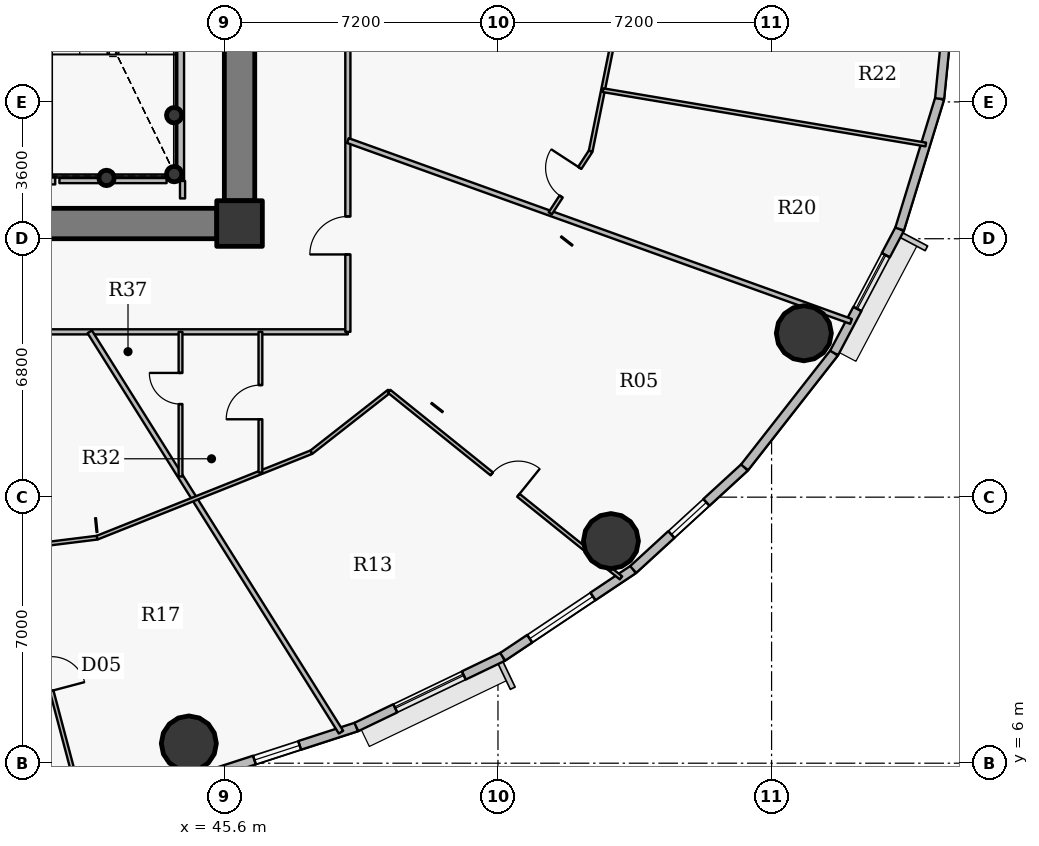
"""IFC4 building model, lengths in metres.
Left out: names, types, materials, properties, quantities, classifications, styles, units other than length and angle.
Written with IfcOpenShell. Run it as: python <this file> out.ifc"""

import sys

from ifc_helpers import new_model, si_unit, direction, frame, frame_2d, origin, origin_2d, place, context, subcontext, project, spatial, rectangle, hollow_circle, extrude, source, transform, mapped, element, fill, save


model = new_model("IFC4")
c1 = context("Model", 3, precision=1e-05, world=origin(), true_north=direction((0.0, 1.0)))
c2 = subcontext(c1, "Body", "Model", "MODEL_VIEW")
j1 = project(units=[si_unit("LENGTHUNIT", "METRE"), si_unit("PLANEANGLEUNIT", "RADIAN")], contexts=[c1])
p1 = place(None, origin())
s1 = spatial("IfcSite", under=j1, at=p1, CompositionType="ELEMENT")
p2 = place(p1, origin())
s2 = spatial("IfcBuilding", under=s1, at=p2, CompositionType="ELEMENT")
p3 = place(p2, frame((0.0, 0.0, 115.95)))
s3 = spatial("IfcBuildingStorey", under=s2, at=p3, CompositionType="ELEMENT", Elevation=115.95)
p4 = place(p3, frame((46.0, 20.2, 0.0), z_axis=(0.0, 0.0, 1.0), x_axis=(1.0, 0.0, 0.0)))
e1 = element("IfcColumn", 1, at=p4, inside=s3, PredefinedType="COLUMN", context=c2, shape_type="SweptSolid", body=[
    extrude(rectangle(XDim=1.2, YDim=1.2, at=origin_2d()), origin(), (0.0, 0.0, 1.0), 3.75),
])
for number, where, z_axis, x_axis in (
    (2, (44.28, 21.5, 0.0), (0.0, 0.0, 1.0), (1.0, 0.0, 0.0)),
    (3, (44.28, 23.05, 0.0), (0.0, 0.0, 1.0), (1.0, 0.0, 0.0)),
    (4, (42.5, 21.4, 0.0), (0.0, 0.0, 1.0), (1.0, 0.0, 0.0)),
):
    element("IfcColumn", number, at=place(p3, frame(where, z_axis=z_axis, x_axis=x_axis)), inside=s3, PredefinedType="COLUMN", context=c2, shape_type="SweptSolid", body=[
        extrude(hollow_circle(Radius=0.203, WallThickness=0.016, at=origin_2d()), origin(), (0.0, 0.0, 1.0), 3.75),
    ])
p5 = place(p3, frame((46.0, 33.2, 0.0), z_axis=(0.0, 0.0, 1.0), x_axis=(0.0, -1.0, 0.0)))
e5 = element("IfcWall", 5, at=p5, inside=s3, PredefinedType="SHEAR", context=c2, shape_type="SweptSolid", body=[
    extrude(rectangle(XDim=12.4, YDim=0.8, at=frame_2d((6.2, 0.0))), origin(), (0.0, 0.0, 1.0), 2.95),
])
p6 = place(p5, frame((5.79, 0.0, 0.0)))
e6 = element("IfcOpeningElement", 6, at=p6, cuts=e5, PredefinedType="OPENING", context=c2, shape_type="SweptSolid", body=[
    extrude(rectangle(XDim=0.82, YDim=2.1, at=origin_2d()), frame((0.41, 0.41, 1.05), z_axis=(0.0, -1.0, 0.0), x_axis=(1.0, 0.0, 0.0)), (0.0, 0.0, 1.0), 0.82),
])
p7 = place(p3, frame((45.4, 20.2, 0.0), z_axis=(0.0, 0.0, 1.0), x_axis=(-1.0, 0.0, 0.0)))
e7 = element("IfcWall", 7, at=p7, inside=s3, PredefinedType="SHEAR", context=c2, shape_type="SweptSolid", body=[
    extrude(rectangle(XDim=18.8, YDim=0.8, at=frame_2d((9.4, 0.0))), origin(), (0.0, 0.0, 1.0), 2.95),
])
p8 = place(p7, frame((10.15, 0.0, 0.0)))
e8 = element("IfcOpeningElement", 8, at=p8, cuts=e7, PredefinedType="OPENING", context=c2, shape_type="SweptSolid", body=[
    extrude(rectangle(XDim=1.15, YDim=2.15, at=origin_2d()), frame((0.575, 0.41, 1.075), z_axis=(0.0, -1.0, 0.0), x_axis=(1.0, 0.0, 0.0)), (0.0, 0.0, 1.0), 0.82),
])
for number, where, z_axis, x_axis in (
    (9, (44.666, 6.519, 0.0), (0.0, 0.0, 1.0), (1.0, 0.0, 0.0)),
    (10, (55.773, 11.844, 0.0), (0.0, 0.0, 1.0), (1.0, 0.0, 0.0)),
    (11, (60.849, 17.312, 0.0), (0.0, 0.0, 1.0), (1.0, 0.0, 0.0)),
):
    element("IfcColumn", number, at=place(p3, frame(where, z_axis=z_axis, x_axis=x_axis)), inside=s3, PredefinedType="COLUMN", context=c2, shape_type="SweptSolid", body=[
        extrude(hollow_circle(Radius=0.725, WallThickness=0.042, at=origin_2d()), origin(), (0.0, 0.0, 1.0), 3.75),
    ])
p9 = place(p3, frame((49.074, 6.953, 0.0), z_axis=(0.0, 0.0, 1.0), x_axis=(-0.951211346073, -0.308540070495, 0.0)))
e12 = element("IfcWall", 12, at=p9, inside=s3, PredefinedType="SOLIDWALL", context=c2, shape_type="SweptSolid", body=[
    extrude(rectangle(XDim=4.388, YDim=0.24, at=frame_2d((2.194, 0.0))), origin(), (0.0, 0.0, 1.0), 3.5),
])
p10 = place(p9, frame((1.569, 0.0, 0.9)))
e13 = element("IfcOpeningElement", 13, at=p10, cuts=e12, PredefinedType="OPENING", context=c2, shape_type="SweptSolid", body=[
    extrude(rectangle(XDim=1.25, YDim=1.65, at=origin_2d()), frame((0.625, 0.13, 0.825), z_axis=(0.0, -1.0, 0.0), x_axis=(1.0, 0.0, 0.0)), (0.0, 0.0, 1.0), 0.26),
])
p11 = place(p3, frame((52.925, 8.801, 0.0), z_axis=(0.0, 0.0, 1.0), x_axis=(-0.901589935876, -0.432591709962, 0.0)))
e14 = element("IfcWall", 14, at=p11, inside=s3, PredefinedType="SOLIDWALL", context=c2, shape_type="SweptSolid", body=[
    extrude(rectangle(XDim=4.272, YDim=0.24, at=frame_2d((2.136, 0.0))), origin(), (0.0, 0.0, 1.0), 3.5),
])
p12 = place(p11, frame((1.136, 0.0, 0.9)))
e15 = element("IfcOpeningElement", 15, at=p12, cuts=e14, PredefinedType="OPENING", context=c2, shape_type="SweptSolid", body=[
    extrude(rectangle(XDim=2.0, YDim=1.75, at=origin_2d()), frame((1.0, 0.13, 0.875), z_axis=(0.0, -1.0, 0.0), x_axis=(1.0, 0.0, 0.0)), (0.0, 0.0, 1.0), 0.26),
])
p13 = place(p3, frame((56.358, 11.097, 0.0), z_axis=(0.0, 0.0, 1.0), x_axis=(-0.831221811447, -0.555940914284, 0.0)))
e16 = element("IfcWall", 16, at=p13, inside=s3, PredefinedType="SOLIDWALL", context=c2, shape_type="SweptSolid", body=[
    extrude(rectangle(XDim=4.13, YDim=0.24, at=frame_2d((2.065, 0.0))), origin(), (0.0, 0.0, 1.0), 3.5),
])
p14 = place(p13, frame((1.276, 0.0, 0.9)))
e17 = element("IfcOpeningElement", 17, at=p14, cuts=e16, PredefinedType="OPENING", context=c2, shape_type="SweptSolid", body=[
    extrude(rectangle(XDim=2.0, YDim=1.75, at=origin_2d()), frame((1.0, 0.13, 0.875), z_axis=(0.0, -1.0, 0.0), x_axis=(1.0, 0.0, 0.0)), (0.0, 0.0, 1.0), 0.26),
])
p15 = place(p3, frame((59.289, 13.783, 0.0), z_axis=(0.0, 0.0, 1.0), x_axis=(-0.737113356241, -0.675769117414, 0.0)))
e18 = element("IfcWall", 18, at=p15, inside=s3, PredefinedType="SOLIDWALL", context=c2, shape_type="SweptSolid", body=[
    extrude(rectangle(XDim=3.976, YDim=0.24, at=frame_2d((1.988, 0.0))), origin(), (0.0, 0.0, 1.0), 3.5),
])
p16 = place(p15, frame((1.363, 0.0, 0.9)))
e19 = element("IfcOpeningElement", 19, at=p16, cuts=e18, PredefinedType="OPENING", context=c2, shape_type="SweptSolid", body=[
    extrude(rectangle(XDim=1.25, YDim=1.65, at=origin_2d()), frame((0.625, 0.13, 0.825), z_axis=(0.0, -1.0, 0.0), x_axis=(1.0, 0.0, 0.0)), (0.0, 0.0, 1.0), 0.26),
])
p17 = place(p3, frame((61.645, 16.794, 0.0), z_axis=(0.0, 0.0, 1.0), x_axis=(-0.616272103517, -0.787533297345, 0.0)))
e20 = element("IfcWall", 20, at=p17, inside=s3, PredefinedType="SOLIDWALL", context=c2, shape_type="SweptSolid", body=[
    extrude(rectangle(XDim=3.823, YDim=0.24, at=frame_2d((1.912, 0.0))), origin(), (0.0, 0.0, 1.0), 3.5),
])
p18 = place(p3, frame((63.37, 20.055, 0.0), z_axis=(0.0, 0.0, 1.0), x_axis=(-0.467614004126, -0.883932770716, 0.0)))
e21 = element("IfcWall", 21, at=p18, inside=s3, PredefinedType="SOLIDWALL", context=c2, shape_type="SweptSolid", body=[
    extrude(rectangle(XDim=3.689, YDim=0.24, at=frame_2d((1.844, 0.0))), origin(), (0.0, 0.0, 1.0), 3.5),
])
p19 = place(p18, frame((0.778, 0.0, 0.9)))
e22 = element("IfcOpeningElement", 22, at=p19, cuts=e21, PredefinedType="OPENING", context=c2, shape_type="SweptSolid", body=[
    extrude(rectangle(XDim=1.6, YDim=1.75, at=origin_2d()), frame((0.8, 0.13, 0.875), z_axis=(0.0, -1.0, 0.0), x_axis=(1.0, 0.0, 0.0)), (0.0, 0.0, 1.0), 0.26),
])
p20 = place(p3, frame((64.422, 23.485, 0.0), z_axis=(0.0, 0.0, 1.0), x_axis=(-0.293124431344, -0.956074300329, 0.0)))
e23 = element("IfcWall", 23, at=p20, inside=s3, PredefinedType="SOLIDWALL", context=c2, shape_type="SweptSolid", body=[
    extrude(rectangle(XDim=3.587, YDim=0.24, at=frame_2d((1.793, 0.0))), origin(), (0.0, 0.0, 1.0), 3.5),
])
p21 = place(p3, frame((64.775, 27.0, 0.0), z_axis=(0.0, 0.0, 1.0), x_axis=(-0.099989468229, -0.994988495533, 0.0)))
e24 = element("IfcWall", 24, at=p21, inside=s3, PredefinedType="SOLIDWALL", context=c2, shape_type="SweptSolid", body=[
    extrude(rectangle(XDim=3.533, YDim=0.24, at=frame_2d((1.767, 0.0))), origin(), (0.0, 0.0, 1.0), 3.5),
])
p22 = place(p3, frame((35.584, 17.35, 0.0), z_axis=(0.0, 0.0, 1.0), x_axis=(1.0, 0.0, 0.0)))
e25 = element("IfcWall", 25, at=p22, inside=s3, PredefinedType="PARTITIONING", context=c2, shape_type="SweptSolid", body=[
    extrude(rectangle(XDim=13.266, YDim=0.135, at=frame_2d((6.633, 0.0))), origin(), (0.0, 0.0, 1.0), 2.935),
])
p23 = place(p22, frame((2.757, 0.0, 0.0)))
e26 = element("IfcOpeningElement", 26, at=p23, cuts=e25, PredefinedType="OPENING", context=c2, shape_type="SweptSolid", body=[
    extrude(rectangle(XDim=1.0, YDim=2.15, at=origin_2d()), frame((0.5, 0.078, 1.075), z_axis=(0.0, -1.0, 0.0), x_axis=(1.0, 0.0, 0.0)), (0.0, 0.0, 1.0), 0.155),
])
p24 = place(p3, frame((40.059, 11.662, 0.0), z_axis=(0.0, 0.0, 1.0), x_axis=(0.255861334688, -0.966713492929, 0.0)))
e27 = element("IfcWall", 27, at=p24, inside=s3, PredefinedType="PARTITIONING", context=c2, shape_type="SweptSolid", body=[
    extrude(rectangle(XDim=6.877, YDim=0.1, at=frame_2d((3.438, 0.0))), origin(), (0.0, 0.0, 1.0), 2.935),
])
p25 = place(p24, frame((2.988, 0.0, 0.0)))
e28 = element("IfcOpeningElement", 28, at=p25, cuts=e27, PredefinedType="OPENING", context=c2, shape_type="SweptSolid", body=[
    extrude(rectangle(XDim=0.9, YDim=2.1, at=origin_2d()), frame((0.45, 0.06, 1.05), z_axis=(0.0, -1.0, 0.0), x_axis=(1.0, 0.0, 0.0)), (0.0, 0.0, 1.0), 0.12),
])
p26 = place(p3, frame((40.059, 11.662, 0.0), z_axis=(0.0, 0.0, 1.0), x_axis=(0.992393057675, 0.12310978466, 0.0)))
e29 = element("IfcWall", 29, at=p26, inside=s3, PredefinedType="PARTITIONING", context=c2, shape_type="SweptSolid", body=[
    extrude(rectangle(XDim=2.209, YDim=0.1, at=frame_2d((1.104, 0.0))), origin(), (0.0, 0.0, 1.0), 2.935),
])
p27 = place(p3, frame((40.9, 21.33, 0.0), z_axis=(0.0, 0.0, 1.0), x_axis=(1.0, 0.0, 0.0)))
e30 = element("IfcWall", 30, at=p27, inside=s3, PredefinedType="PARTITIONING", context=c2, shape_type="SweptSolid", body=[
    extrude(rectangle(XDim=0.25, YDim=0.2, at=frame_2d((0.125, 0.0))), origin(), (0.0, 0.0, 1.0), 3.035),
])
p28 = place(p3, frame((42.058, 17.35, 0.0), z_axis=(0.0, 0.0, 1.0), x_axis=(0.531660079213, -0.846957826678, 0.0)))
e31 = element("IfcWall", 31, at=p28, inside=s3, PredefinedType="PARTITIONING", context=c2, shape_type="SweptSolid", body=[
    extrude(rectangle(XDim=12.437, YDim=0.135, at=frame_2d((6.219, 0.0))), origin(), (0.0, 0.0, 1.0), 2.935),
])
p29 = place(p3, frame((42.251, 11.934, 0.0), z_axis=(0.0, 0.0, 1.0), x_axis=(0.928803554156, 0.370572473055, 0.0)))
e32 = element("IfcWall", 32, at=p29, inside=s3, PredefinedType="PARTITIONING", context=c2, shape_type="SweptSolid", body=[
    extrude(rectangle(XDim=6.072, YDim=0.1, at=frame_2d((3.036, 0.0))), origin(), (0.0, 0.0, 1.0), 2.935),
])
p30 = place(p3, frame((44.44, 21.33, 0.0), z_axis=(0.0, 0.0, 1.0), x_axis=(0.0, 1.0, 0.0)))
e33 = element("IfcWall", 33, at=p30, inside=s3, PredefinedType="PARTITIONING", context=c2, shape_type="SweptSolid", body=[
    extrude(rectangle(XDim=8.52, YDim=0.2, at=frame_2d((4.26, 0.0))), origin(), (0.0, 0.0, 1.0), 3.5),
])
p31 = place(p3, frame((44.447, 13.544, 0.0), z_axis=(0.0, 0.0, 1.0), x_axis=(0.0, 1.0, 0.0)))
e34 = element("IfcWall", 34, at=p31, inside=s3, PredefinedType="PARTITIONING", context=c2, shape_type="SweptSolid", body=[
    extrude(rectangle(XDim=3.806, YDim=0.1, at=frame_2d((1.903, 0.0))), origin(), (0.0, 0.0, 1.0), 3.5),
])
p32 = place(p31, frame((1.905, 0.0, 0.0)))
e35 = element("IfcOpeningElement", 35, at=p32, cuts=e34, PredefinedType="OPENING", context=c2, shape_type="SweptSolid", body=[
    extrude(rectangle(XDim=0.82, YDim=2.1, at=origin_2d()), frame((0.41, 0.06, 1.05), z_axis=(0.0, -1.0, 0.0), x_axis=(1.0, 0.0, 0.0)), (0.0, 0.0, 1.0), 0.12),
])
p33 = place(p3, frame((46.549, 13.649, 0.0), z_axis=(0.0, 0.0, 1.0), x_axis=(0.0, 1.0, 0.0)))
e36 = element("IfcWall", 36, at=p33, inside=s3, PredefinedType="PARTITIONING", context=c2, shape_type="SweptSolid", body=[
    extrude(rectangle(XDim=3.701, YDim=0.1, at=frame_2d((1.851, 0.0))), origin(), (0.0, 0.0, 1.0), 3.5),
])
p34 = place(p33, frame((1.4, 0.0, 0.0)))
e37 = element("IfcOpeningElement", 37, at=p34, cuts=e36, PredefinedType="OPENING", context=c2, shape_type="SweptSolid", body=[
    extrude(rectangle(XDim=0.9, YDim=2.1, at=origin_2d()), frame((0.45, 0.06, 1.05), z_axis=(0.0, -1.0, 0.0), x_axis=(1.0, 0.0, 0.0)), (0.0, 0.0, 1.0), 0.12),
])
p35 = place(p3, frame((47.891, 14.184, 0.0), z_axis=(0.0, 0.0, 1.0), x_axis=(0.787364158956, 0.616488184146, 0.0)))
e38 = element("IfcWall", 38, at=p35, inside=s3, PredefinedType="PARTITIONING", context=c2, shape_type="SweptSolid", body=[
    extrude(rectangle(XDim=2.597, YDim=0.1, at=frame_2d((1.299, 0.0))), origin(), (0.0, 0.0, 1.0), 3.5),
])
p36 = place(p3, frame((48.85, 17.35, 0.0), z_axis=(0.0, 0.0, 1.0), x_axis=(0.0, 1.0, 0.0)))
e39 = element("IfcWall", 39, at=p36, inside=s3, PredefinedType="PARTITIONING", context=c2, shape_type="SweptSolid", body=[
    extrude(rectangle(XDim=19.3, YDim=0.135, at=frame_2d((9.65, 0.0))), origin(), (0.0, 0.0, 1.0), 2.935),
])
p37 = place(p36, frame((2.036, 0.0, 0.0)))
e40 = element("IfcOpeningElement", 40, at=p37, cuts=e39, PredefinedType="OPENING", context=c2, shape_type="SweptSolid", body=[
    extrude(rectangle(XDim=1.0, YDim=2.15, at=origin_2d()), frame((0.5, 0.078, 1.075), z_axis=(0.0, -1.0, 0.0), x_axis=(1.0, 0.0, 0.0)), (0.0, 0.0, 1.0), 0.155),
])
p38 = place(p36, frame((10.875, 0.0, 0.0)))
e41 = element("IfcOpeningElement", 41, at=p38, cuts=e39, PredefinedType="OPENING", context=c2, shape_type="SweptSolid", body=[
    extrude(rectangle(XDim=1.0, YDim=2.15, at=origin_2d()), frame((0.5, 0.078, 1.075), z_axis=(0.0, -1.0, 0.0), x_axis=(1.0, 0.0, 0.0)), (0.0, 0.0, 1.0), 0.155),
])
p39 = place(p3, frame((48.85, 22.383, 0.0), z_axis=(0.0, 0.0, 1.0), x_axis=(0.941089213164, -0.338158384292, 0.0)))
e42 = element("IfcWall", 42, at=p39, inside=s3, PredefinedType="PARTITIONING", context=c2, shape_type="SweptSolid", body=[
    extrude(rectangle(XDim=14.069, YDim=0.135, at=frame_2d((7.035, 0.0))), origin(), (0.0, 0.0, 1.0), 2.935),
])
p40 = place(p3, frame((49.936, 15.786, 0.0), z_axis=(0.0, 0.0, 1.0), x_axis=(0.779083359145, -0.626920345421, 0.0)))
e43 = element("IfcWall", 43, at=p40, inside=s3, PredefinedType="PARTITIONING", context=c2, shape_type="SweptSolid", body=[
    extrude(rectangle(XDim=7.831, YDim=0.1, at=frame_2d((3.916, 0.0))), origin(), (0.0, 0.0, 1.0), 2.935),
])
p41 = place(p40, frame((3.466, 0.0, 0.0)))
e44 = element("IfcOpeningElement", 44, at=p41, cuts=e43, PredefinedType="OPENING", context=c2, shape_type="SweptSolid", body=[
    extrude(rectangle(XDim=0.9, YDim=2.1, at=origin_2d()), frame((0.45, 0.06, 1.05), z_axis=(0.0, -1.0, 0.0), x_axis=(1.0, 0.0, 0.0)), (0.0, 0.0, 1.0), 0.12),
])
p42 = place(p3, frame((54.176, 20.469, 0.0), z_axis=(0.0, 0.0, 1.0), x_axis=(0.545370803514, 0.838194897786, 0.0)))
e45 = element("IfcWall", 45, at=p42, inside=s3, PredefinedType="PARTITIONING", context=c2, shape_type="SweptSolid", body=[
    extrude(rectangle(XDim=1.952, YDim=0.1, at=frame_2d((0.976, 0.0))), origin(), (0.0, 0.0, 1.0), 3.5),
])
p43 = place(p42, frame((0.526, 0.0, 0.0)))
e46 = element("IfcOpeningElement", 46, at=p43, cuts=e45, PredefinedType="OPENING", context=c2, shape_type="SweptSolid", body=[
    extrude(rectangle(XDim=0.9, YDim=2.1, at=origin_2d()), frame((0.45, 0.06, 1.05), z_axis=(0.0, -1.0, 0.0), x_axis=(1.0, 0.0, 0.0)), (0.0, 0.0, 1.0), 0.12),
])
p44 = place(p3, frame((55.24, 22.105, 0.0), z_axis=(0.0, 0.0, 1.0), x_axis=(0.198205355444, 0.980160515973, 0.0)))
e47 = element("IfcWall", 47, at=p44, inside=s3, PredefinedType="PARTITIONING", context=c2, shape_type="SweptSolid", body=[
    extrude(rectangle(XDim=4.112, YDim=0.1, at=frame_2d((2.056, 0.0))), origin(), (0.0, 0.0, 1.0), 3.5),
])
p45 = place(p3, frame((55.564, 23.708, 0.0), z_axis=(0.0, 0.0, 1.0), x_axis=(0.986139151265, -0.165920385556, 0.0)))
e48 = element("IfcWall", 48, at=p45, inside=s3, PredefinedType="PARTITIONING", context=c2, shape_type="SweptSolid", body=[
    extrude(rectangle(XDim=8.612, YDim=0.1, at=frame_2d((4.306, 0.0))), origin(), (0.0, 0.0, 1.0), 2.935),
])
p46 = place(p3, frame((44.08, 21.33, 0.0), z_axis=(0.0, 0.0, 1.0), x_axis=(-1.0, 0.0, 0.0)))
e49 = element("IfcWall", 49, at=p46, inside=s3, PredefinedType="PARTITIONING", context=c2, shape_type="SweptSolid", body=[
    extrude(rectangle(XDim=2.82, YDim=0.135, at=frame_2d((1.41, 0.0))), origin(), (0.0, 0.0, 1.0), 3.035),
])
p47 = place(p3, frame((44.5, 20.86, 0.0), z_axis=(0.0, 0.0, 1.0), x_axis=(0.0, 1.0, 0.0)))
e50 = element("IfcWall", 50, at=p47, inside=s3, PredefinedType="PARTITIONING", context=c2, shape_type="SweptSolid", body=[
    extrude(rectangle(XDim=0.46, YDim=0.135, at=frame_2d((0.23, 0.0))), origin(), (0.0, 0.0, 1.0), 3.5),
])
p48 = place(p3, frame((45.41, 19.8, 0.0), z_axis=(0.0, 0.0, 1.0), x_axis=(1.0, 0.0, 0.0)))
e51 = element("IfcWall", 51, at=p48, inside=s3, PredefinedType="PARTITIONING", context=c2, shape_type="SweptSolid", body=[
    extrude(rectangle(XDim=0.99, YDim=0.135, at=frame_2d((0.495, 0.0))), origin(), (0.0, 0.0, 1.0), 2.935),
])
p49 = place(p3, frame((46.4, 20.107, 0.0), z_axis=(0.0, 0.0, 1.0), x_axis=(0.0, 1.0, 0.0)))
e52 = element("IfcWall", 52, at=p49, inside=s3, PredefinedType="PARTITIONING", context=c2, shape_type="SweptSolid", body=[
    extrude(rectangle(XDim=0.683, YDim=0.135, at=frame_2d((0.341, 0.0))), origin(), (0.0, 0.0, 1.0), 3.5),
])
m1 = source(origin(), c2, "Body", "SweptSolid", [
    extrude(rectangle(XDim=2.0, YDim=1.75, at=origin_2d()), frame((1.0, 0.03, 0.875), z_axis=(0.0, -1.0, 0.0), x_axis=(1.0, 0.0, 0.0)), (0.0, 0.0, 1.0), 0.06),
])
p50 = place(p12, origin())
e53 = element("IfcWindow", 53, at=p50, inside=s3, PartitioningType="DOUBLE_PANEL_VERTICAL", PredefinedType="WINDOW", context=c2, shape_type="MappedRepresentation", body=[
    mapped(m1, transform((0.0, 0.0, 0.0), x_axis=(1.0, 0.0, 0.0), y_axis=(0.0, 1.0, 0.0), z_axis=(0.0, 0.0, 1.0), scale=1.0)),
])
fill(e15, e53)
p51 = place(p14, origin())
e54 = element("IfcWindow", 54, at=p51, inside=s3, PartitioningType="DOUBLE_PANEL_VERTICAL", PredefinedType="WINDOW", context=c2, shape_type="MappedRepresentation", body=[
    mapped(m1, transform((0.0, 0.0, 0.0), x_axis=(1.0, 0.0, 0.0), y_axis=(0.0, 1.0, 0.0), z_axis=(0.0, 0.0, 1.0), scale=1.0)),
])
fill(e17, e54)
m2 = source(origin(), c2, "Body", "SweptSolid", [
    extrude(rectangle(XDim=1.6, YDim=1.75, at=origin_2d()), frame((0.8, 0.03, 0.875), z_axis=(0.0, -1.0, 0.0), x_axis=(1.0, 0.0, 0.0)), (0.0, 0.0, 1.0), 0.06),
])
p52 = place(p19, origin())
e55 = element("IfcWindow", 55, at=p52, inside=s3, PartitioningType="DOUBLE_PANEL_VERTICAL", PredefinedType="WINDOW", context=c2, shape_type="MappedRepresentation", body=[
    mapped(m2, transform((0.0, 0.0, 0.0), x_axis=(1.0, 0.0, 0.0), y_axis=(0.0, 1.0, 0.0), z_axis=(0.0, 0.0, 1.0), scale=1.0)),
])
fill(e22, e55)
m3 = source(origin(), c2, "Body", "SweptSolid", [
    extrude(rectangle(XDim=1.25, YDim=1.65, at=origin_2d()), frame((0.625, 0.03, 0.825), z_axis=(0.0, -1.0, 0.0), x_axis=(1.0, 0.0, 0.0)), (0.0, 0.0, 1.0), 0.06),
])
p53 = place(p10, origin())
e56 = element("IfcWindow", 56, at=p53, inside=s3, PartitioningType="SINGLE_PANEL", PredefinedType="WINDOW", context=c2, shape_type="MappedRepresentation", body=[
    mapped(m3, transform((0.0, 0.0, 0.0), x_axis=(1.0, 0.0, 0.0), y_axis=(0.0, 1.0, 0.0), z_axis=(0.0, 0.0, 1.0), scale=1.0)),
])
fill(e13, e56)
p54 = place(p16, origin())
e57 = element("IfcWindow", 57, at=p54, inside=s3, PartitioningType="SINGLE_PANEL", PredefinedType="WINDOW", context=c2, shape_type="MappedRepresentation", body=[
    mapped(m3, transform((0.0, 0.0, 0.0), x_axis=(1.0, 0.0, 0.0), y_axis=(0.0, 1.0, 0.0), z_axis=(0.0, 0.0, 1.0), scale=1.0)),
])
fill(e19, e57)
m4 = source(origin(), c2, "Body", "SweptSolid", [
    extrude(rectangle(XDim=0.9, YDim=2.1, at=origin_2d()), frame((0.45, 0.025, 1.05), z_axis=(0.0, -1.0, 0.0), x_axis=(1.0, 0.0, 0.0)), (0.0, 0.0, 1.0), 0.05),
])
p55 = place(p25, origin())
e58 = element("IfcDoor", 58, at=p55, inside=s3, OperationType="SINGLE_SWING_RIGHT", PredefinedType="DOOR", context=c2, shape_type="MappedRepresentation", body=[
    mapped(m4, transform((0.0, 0.0, 0.0), x_axis=(1.0, 0.0, 0.0), y_axis=(0.0, 1.0, 0.0), z_axis=(0.0, 0.0, 1.0), scale=1.0)),
])
fill(e28, e58)
m5 = source(origin(), c2, "Body", "SweptSolid", [
    extrude(rectangle(XDim=1.0, YDim=2.15, at=origin_2d()), frame((0.5, 0.025, 1.075), z_axis=(0.0, -1.0, 0.0), x_axis=(1.0, 0.0, 0.0)), (0.0, 0.0, 1.0), 0.05),
])
p56 = place(p37, origin())
e59 = element("IfcDoor", 59, at=p56, inside=s3, OperationType="SINGLE_SWING_LEFT", PredefinedType="DOOR", context=c2, shape_type="MappedRepresentation", body=[
    mapped(m5, transform((0.0, 0.0, 0.0), x_axis=(1.0, 0.0, 0.0), y_axis=(0.0, 1.0, 0.0), z_axis=(0.0, 0.0, 1.0), scale=1.0)),
])
fill(e40, e59)
p57 = place(p41, origin())
e60 = element("IfcDoor", 60, at=p57, inside=s3, OperationType="SINGLE_SWING_RIGHT", PredefinedType="DOOR", context=c2, shape_type="MappedRepresentation", body=[
    mapped(m4, transform((0.0, 0.0, 0.0), x_axis=(1.0, 0.0, 0.0), y_axis=(0.0, 1.0, 0.0), z_axis=(0.0, 0.0, 1.0), scale=1.0)),
])
fill(e44, e60)
p58 = place(p34, origin())
e61 = element("IfcDoor", 61, at=p58, inside=s3, OperationType="SINGLE_SWING_LEFT", PredefinedType="DOOR", context=c2, shape_type="MappedRepresentation", body=[
    mapped(m4, transform((0.0, 0.0, 0.0), x_axis=(1.0, 0.0, 0.0), y_axis=(0.0, 1.0, 0.0), z_axis=(0.0, 0.0, 1.0), scale=1.0)),
])
fill(e37, e61)
m6 = source(origin(), c2, "Body", "SweptSolid", [
    extrude(rectangle(XDim=0.82, YDim=2.1, at=origin_2d()), frame((0.41, 0.025, 1.05), z_axis=(0.0, -1.0, 0.0), x_axis=(1.0, 0.0, 0.0)), (0.0, 0.0, 1.0), 0.05),
])
p59 = place(p32, origin())
e62 = element("IfcDoor", 62, at=p59, inside=s3, OperationType="SINGLE_SWING_RIGHT", PredefinedType="DOOR", context=c2, shape_type="MappedRepresentation", body=[
    mapped(m6, transform((0.0, 0.0, 0.0), x_axis=(1.0, 0.0, 0.0), y_axis=(0.0, 1.0, 0.0), z_axis=(0.0, 0.0, 1.0), scale=1.0)),
])
fill(e35, e62)
p60 = place(p43, origin())
e63 = element("IfcDoor", 63, at=p60, inside=s3, OperationType="SINGLE_SWING_RIGHT", PredefinedType="DOOR", context=c2, shape_type="MappedRepresentation", body=[
    mapped(m4, transform((0.0, 0.0, 0.0), x_axis=(1.0, 0.0, 0.0), y_axis=(0.0, 1.0, 0.0), z_axis=(0.0, 0.0, 1.0), scale=1.0)),
])
fill(e46, e63)
save(model, sys.argv[1])
